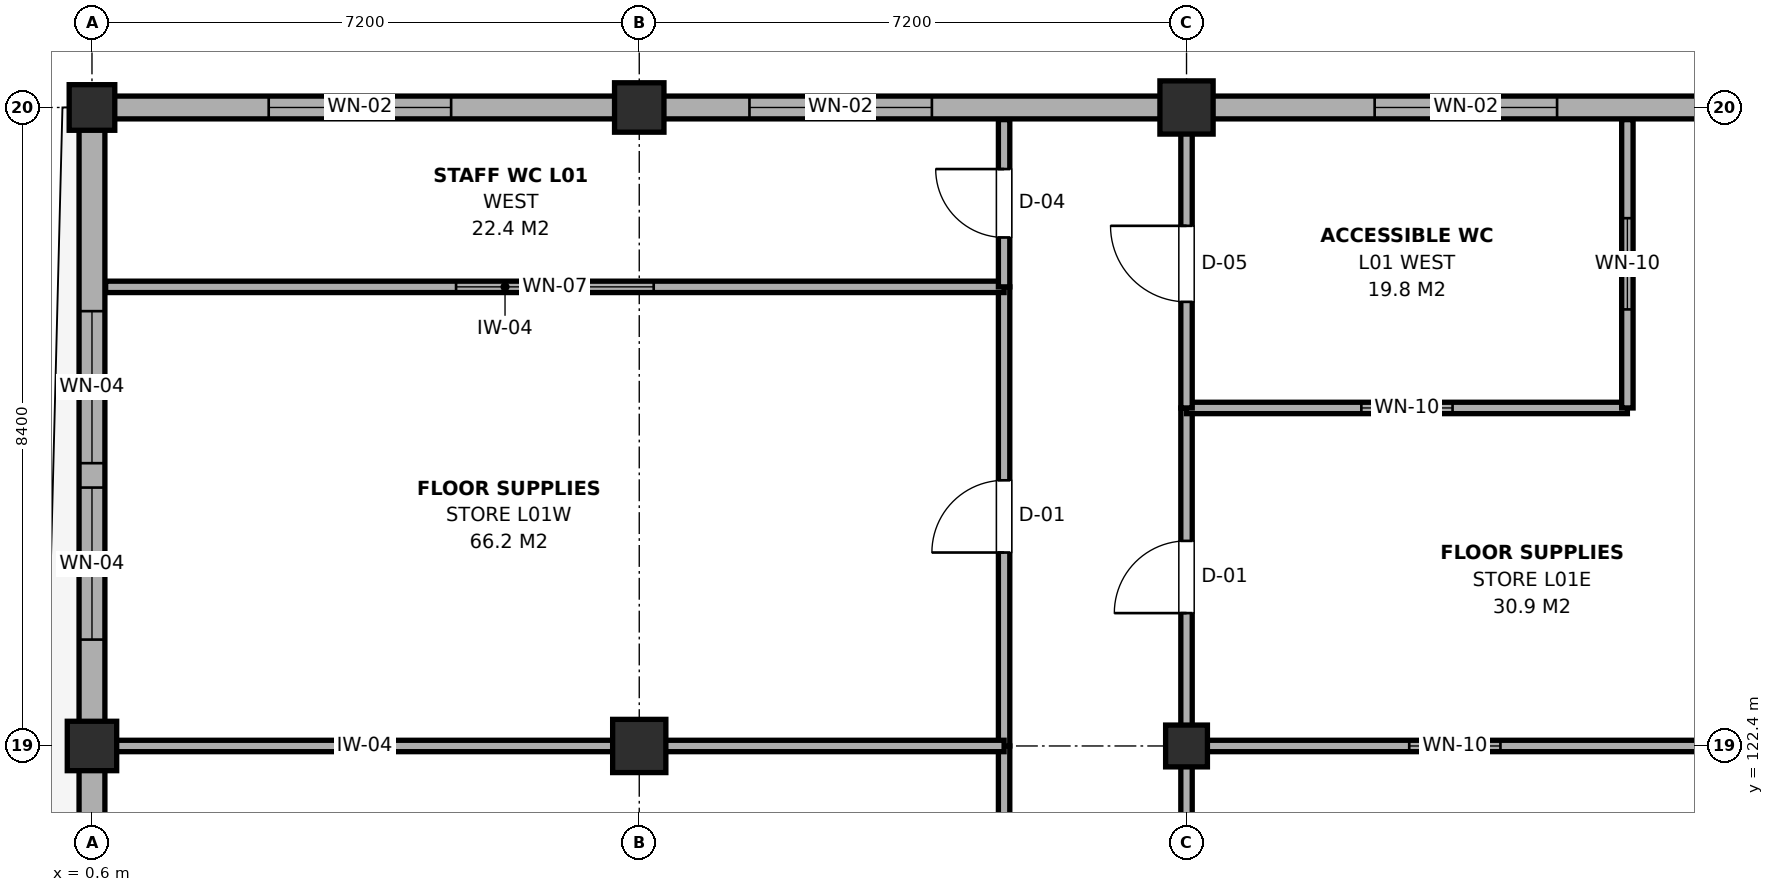
"""IFC4 building model, lengths in metres.
Left out: names, types, materials, properties, quantities, classifications, styles, units other than length and angle.
Written with IfcOpenShell. Run it as: python <this file> out.ifc"""

import sys

from ifc_helpers import new_model, si_unit, direction, frame, frame_2d, origin, origin_2d, place, context, subcontext, project, spatial, rectangle, extrude, element, fill, save


model = new_model("IFC4")
c1 = context("Model", 3, precision=1e-05, world=origin(), true_north=direction((0.0, 1.0)))
c2 = subcontext(c1, "Body", "Model", "MODEL_VIEW")
j1 = project(units=[si_unit("LENGTHUNIT", "METRE"), si_unit("PLANEANGLEUNIT", "RADIAN")], contexts=[c1])
p1 = place(None, origin())
s1 = spatial("IfcSite", under=j1, at=p1, CompositionType="ELEMENT")
p2 = place(p1, origin())
s2 = spatial("IfcBuilding", under=s1, at=p2, CompositionType="ELEMENT")
p3 = place(p2, frame((0.0, 0.0, 4.8)))
s3 = spatial("IfcBuildingStorey", under=s2, at=p3, CompositionType="ELEMENT", Elevation=4.8)
p4 = place(p3, frame((0.6, 122.4, 0.0), z_axis=(0.0, 0.0, 1.0), x_axis=(1.0, 0.0, 0.0)))
e1 = element("IfcColumn", 1, at=p4, inside=s3, PredefinedType="COLUMN", context=c2, shape_type="SweptSolid", body=[
    extrude(rectangle(XDim=0.65, YDim=0.65, at=origin_2d()), origin(), (0.0, 0.0, 1.0), 4.2),
])
p5 = place(p3, frame((0.6, 130.8, 0.0), z_axis=(0.0, 0.0, 1.0), x_axis=(1.0, 0.0, 0.0)))
e2 = element("IfcColumn", 2, at=p5, inside=s3, PredefinedType="COLUMN", context=c2, shape_type="SweptSolid", body=[
    extrude(rectangle(XDim=0.6, YDim=0.6, at=origin_2d()), origin(), (0.0, 0.0, 1.0), 4.2),
])
p6 = place(p3, frame((7.8, 122.4, 0.0), z_axis=(0.0, 0.0, 1.0), x_axis=(1.0, 0.0, 0.0)))
e3 = element("IfcColumn", 3, at=p6, inside=s3, PredefinedType="COLUMN", context=c2, shape_type="SweptSolid", body=[
    extrude(rectangle(XDim=0.7, YDim=0.7, at=origin_2d()), origin(), (0.0, 0.0, 1.0), 4.2),
])
p7 = place(p3, frame((7.8, 130.8, 0.0), z_axis=(0.0, 0.0, 1.0), x_axis=(1.0, 0.0, 0.0)))
e4 = element("IfcColumn", 4, at=p7, inside=s3, PredefinedType="COLUMN", context=c2, shape_type="SweptSolid", body=[
    extrude(rectangle(XDim=0.65, YDim=0.65, at=origin_2d()), origin(), (0.0, 0.0, 1.0), 4.2),
])
p8 = place(p3, frame((15.0, 122.4, 0.0), z_axis=(0.0, 0.0, 1.0), x_axis=(1.0, 0.0, 0.0)))
e5 = element("IfcColumn", 5, at=p8, inside=s3, PredefinedType="COLUMN", context=c2, shape_type="SweptSolid", body=[
    extrude(rectangle(XDim=0.55, YDim=0.55, at=origin_2d()), origin(), (0.0, 0.0, 1.0), 4.2),
])
p9 = place(p3, frame((15.0, 130.8, 0.0), z_axis=(0.0, 0.0, 1.0), x_axis=(1.0, 0.0, 0.0)))
e6 = element("IfcColumn", 6, at=p9, inside=s3, PredefinedType="COLUMN", context=c2, shape_type="SweptSolid", body=[
    extrude(rectangle(XDim=0.7, YDim=0.7, at=origin_2d()), origin(), (0.0, 0.0, 1.0), 4.2),
])
p10 = place(p3, frame((0.6, 113.4, 0.0), z_axis=(0.0, 0.0, 1.0), x_axis=(0.0, 1.0, 0.0)))
e7 = element("IfcWall", 7, at=p10, inside=s3, PredefinedType="SOLIDWALL", context=c2, shape_type="SweptSolid", body=[
    extrude(rectangle(XDim=9.0, YDim=0.34, at=frame_2d((4.5, 0.0))), origin(), (0.0, 0.0, 1.0), 3.585),
])
p11 = place(p10, frame((1.52, 0.0, 0.9)))
e8 = element("IfcOpeningElement", 8, at=p11, cuts=e7, PredefinedType="OPENING", context=c2, shape_type="SweptSolid", body=[
    extrude(rectangle(XDim=2.0, YDim=1.8, at=frame_2d((1.0, 0.9))), frame((0.0, 0.185, 0.0), z_axis=(0.0, -1.0, 0.0), x_axis=(1.0, 0.0, 0.0)), (0.0, 0.0, 1.0), 0.37),
])
p12 = place(p10, frame((5.48, 0.0, 0.9)))
e9 = element("IfcOpeningElement", 9, at=p12, cuts=e7, PredefinedType="OPENING", context=c2, shape_type="SweptSolid", body=[
    extrude(rectangle(XDim=2.0, YDim=1.8, at=frame_2d((1.0, 0.9))), frame((0.0, 0.185, 0.0), z_axis=(0.0, -1.0, 0.0), x_axis=(1.0, 0.0, 0.0)), (0.0, 0.0, 1.0), 0.37),
])
p13 = place(p3, frame((0.6, 122.4, 0.0), z_axis=(0.0, 0.0, 1.0), x_axis=(0.0, 1.0, 0.0)))
e10 = element("IfcWall", 10, at=p13, inside=s3, PredefinedType="SOLIDWALL", context=c2, shape_type="SweptSolid", body=[
    extrude(rectangle(XDim=8.57, YDim=0.34, at=frame_2d((4.285, 0.0))), origin(), (0.0, 0.0, 1.0), 3.625),
])
p14 = place(p13, frame((1.4, 0.0, 0.9)))
e11 = element("IfcOpeningElement", 11, at=p14, cuts=e10, PredefinedType="OPENING", context=c2, shape_type="SweptSolid", body=[
    extrude(rectangle(XDim=2.0, YDim=1.8, at=frame_2d((1.0, 0.9))), frame((0.0, 0.185, 0.0), z_axis=(0.0, -1.0, 0.0), x_axis=(1.0, 0.0, 0.0)), (0.0, 0.0, 1.0), 0.37),
])
p15 = place(p13, frame((3.72, 0.0, 0.9)))
e12 = element("IfcOpeningElement", 12, at=p15, cuts=e10, PredefinedType="OPENING", context=c2, shape_type="SweptSolid", body=[
    extrude(rectangle(XDim=2.0, YDim=1.8, at=frame_2d((1.0, 0.9))), frame((0.0, 0.185, 0.0), z_axis=(0.0, -1.0, 0.0), x_axis=(1.0, 0.0, 0.0)), (0.0, 0.0, 1.0), 0.37),
])
p16 = place(p3, frame((0.45, 130.8, 0.0), z_axis=(0.0, 0.0, 1.0), x_axis=(1.0, 0.0, 0.0)))
e13 = element("IfcWall", 13, at=p16, inside=s3, PredefinedType="SOLIDWALL", context=c2, shape_type="SweptSolid", body=[
    extrude(rectangle(XDim=7.35, YDim=0.3, at=frame_2d((3.675, 0.0))), origin(), (0.0, 0.0, 1.0), 3.425),
])
p17 = place(p16, frame((2.475, 0.0, 0.9)))
e14 = element("IfcOpeningElement", 14, at=p17, cuts=e13, PredefinedType="OPENING", context=c2, shape_type="SweptSolid", body=[
    extrude(rectangle(XDim=2.4, YDim=2.1, at=frame_2d((1.2, 1.05))), frame((0.0, 0.165, 0.0), z_axis=(0.0, -1.0, 0.0), x_axis=(1.0, 0.0, 0.0)), (0.0, 0.0, 1.0), 0.33),
])
p18 = place(p3, frame((7.8, 130.8, 0.0), z_axis=(0.0, 0.0, 1.0), x_axis=(1.0, 0.0, 0.0)))
e15 = element("IfcWall", 15, at=p18, inside=s3, PredefinedType="SOLIDWALL", context=c2, shape_type="SweptSolid", body=[
    extrude(rectangle(XDim=7.2, YDim=0.3, at=frame_2d((3.6, 0.0))), origin(), (0.0, 0.0, 1.0), 3.475),
])
p19 = place(p18, frame((1.45, 0.0, 0.9)))
e16 = element("IfcOpeningElement", 16, at=p19, cuts=e15, PredefinedType="OPENING", context=c2, shape_type="SweptSolid", body=[
    extrude(rectangle(XDim=2.4, YDim=2.1, at=frame_2d((1.2, 1.05))), frame((0.0, 0.165, 0.0), z_axis=(0.0, -1.0, 0.0), x_axis=(1.0, 0.0, 0.0)), (0.0, 0.0, 1.0), 0.33),
])
p20 = place(p3, frame((15.0, 130.8, 0.0), z_axis=(0.0, 0.0, 1.0), x_axis=(1.0, 0.0, 0.0)))
e17 = element("IfcWall", 17, at=p20, inside=s3, PredefinedType="SOLIDWALL", context=c2, shape_type="SweptSolid", body=[
    extrude(rectangle(XDim=7.35, YDim=0.3, at=frame_2d((3.675, 0.0))), origin(), (0.0, 0.0, 1.0), 3.525),
])
p21 = place(p20, frame((2.475, 0.0, 0.9)))
e18 = element("IfcOpeningElement", 18, at=p21, cuts=e17, PredefinedType="OPENING", context=c2, shape_type="SweptSolid", body=[
    extrude(rectangle(XDim=2.4, YDim=2.1, at=frame_2d((1.2, 1.05))), frame((0.0, 0.165, 0.0), z_axis=(0.0, -1.0, 0.0), x_axis=(1.0, 0.0, 0.0)), (0.0, 0.0, 1.0), 0.33),
])
p22 = place(p3, frame((12.6, 104.4, 0.0), z_axis=(0.0, 0.0, 1.0), x_axis=(0.0, 1.0, 0.0)))
e19 = element("IfcWall", 19, at=p22, inside=s3, PredefinedType="PARTITIONING", context=c2, shape_type="SweptSolid", body=[
    extrude(rectangle(XDim=18.0, YDim=0.15, at=frame_2d((9.0, 0.0))), origin(), (0.0, 0.0, 1.0), 3.375),
])
p23 = place(p22, frame((8.2, 0.0, 0.0)))
e20 = element("IfcOpeningElement", 20, at=p23, cuts=e19, PredefinedType="OPENING", context=c2, shape_type="SweptSolid", body=[
    extrude(rectangle(XDim=1.6, YDim=2.15, at=frame_2d((0.8, 1.075))), frame((0.0, 0.09, 0.0), z_axis=(0.0, -1.0, 0.0), x_axis=(1.0, 0.0, 0.0)), (0.0, 0.0, 1.0), 0.18),
])
p24 = place(p22, frame((3.2, 0.0, 0.95)))
e21 = element("IfcOpeningElement", 21, at=p24, cuts=e19, PredefinedType="OPENING", context=c2, shape_type="SweptSolid", body=[
    extrude(rectangle(XDim=2.6, YDim=1.5, at=frame_2d((1.3, 0.75))), frame((0.0, 0.09, 0.0), z_axis=(0.0, -1.0, 0.0), x_axis=(1.0, 0.0, 0.0)), (0.0, 0.0, 1.0), 0.18),
])
p25 = place(p22, frame((12.2, 0.0, 0.95)))
e22 = element("IfcOpeningElement", 22, at=p25, cuts=e19, PredefinedType="OPENING", context=c2, shape_type="SweptSolid", body=[
    extrude(rectangle(XDim=2.6, YDim=1.5, at=frame_2d((1.3, 0.75))), frame((0.0, 0.09, 0.0), z_axis=(0.0, -1.0, 0.0), x_axis=(1.0, 0.0, 0.0)), (0.0, 0.0, 1.0), 0.18),
])
p26 = place(p3, frame((12.6, 122.4, 0.0), z_axis=(0.0, 0.0, 1.0), x_axis=(0.0, 1.0, 0.0)))
e23 = element("IfcWall", 23, at=p26, inside=s3, PredefinedType="PARTITIONING", context=c2, shape_type="SweptSolid", body=[
    extrude(rectangle(XDim=6.04, YDim=0.15, at=frame_2d((3.02, 0.0))), origin(), (0.0, 0.0, 1.0), 3.425),
])
p27 = place(p26, frame((2.545, 0.0, 0.0)))
e24 = element("IfcOpeningElement", 24, at=p27, cuts=e23, PredefinedType="OPENING", context=c2, shape_type="SweptSolid", body=[
    extrude(rectangle(XDim=0.95, YDim=2.15, at=frame_2d((0.475, 1.075))), frame((0.0, 0.09, 0.0), z_axis=(0.0, -1.0, 0.0), x_axis=(1.0, 0.0, 0.0)), (0.0, 0.0, 1.0), 0.18),
])
p28 = place(p3, frame((0.78, 128.44, 0.0), z_axis=(0.0, 0.0, 1.0), x_axis=(1.0, 0.0, 0.0)))
e25 = element("IfcWall", 25, at=p28, inside=s3, PredefinedType="PARTITIONING", context=c2, shape_type="SweptSolid", body=[
    extrude(rectangle(XDim=11.82, YDim=0.15, at=frame_2d((5.91, 0.0))), origin(), (0.0, 0.0, 1.0), 3.625),
])
p29 = place(p28, frame((4.61, 0.0, 0.95)))
e26 = element("IfcOpeningElement", 26, at=p29, cuts=e25, PredefinedType="OPENING", context=c2, shape_type="SweptSolid", body=[
    extrude(rectangle(XDim=2.6, YDim=1.5, at=frame_2d((1.3, 0.75))), frame((0.0, 0.09, 0.0), z_axis=(0.0, -1.0, 0.0), x_axis=(1.0, 0.0, 0.0)), (0.0, 0.0, 1.0), 0.18),
])
p30 = place(p3, frame((12.6, 128.44, 0.0), z_axis=(0.0, 0.0, 1.0), x_axis=(0.0, 1.0, 0.0)))
e27 = element("IfcWall", 27, at=p30, inside=s3, PredefinedType="PARTITIONING", context=c2, shape_type="SweptSolid", body=[
    extrude(rectangle(XDim=2.2, YDim=0.15, at=frame_2d((1.1, 0.0))), origin(), (0.0, 0.0, 1.0), 3.475),
])
p31 = place(p30, frame((0.65, 0.0, 0.0)))
e28 = element("IfcOpeningElement", 28, at=p31, cuts=e27, PredefinedType="OPENING", context=c2, shape_type="SweptSolid", body=[
    extrude(rectangle(XDim=0.9, YDim=2.15, at=frame_2d((0.45, 1.075))), frame((0.0, 0.09, 0.0), z_axis=(0.0, -1.0, 0.0), x_axis=(1.0, 0.0, 0.0)), (0.0, 0.0, 1.0), 0.18),
])
p32 = place(p3, frame((0.78, 122.4, 0.0), z_axis=(0.0, 0.0, 1.0), x_axis=(1.0, 0.0, 0.0)))
e29 = element("IfcWall", 29, at=p32, inside=s3, PredefinedType="PARTITIONING", context=c2, shape_type="SweptSolid", body=[
    extrude(rectangle(XDim=11.82, YDim=0.15, at=frame_2d((5.91, 0.0))), origin(), (0.0, 0.0, 1.0), 3.375),
])
p33 = place(p3, frame((15.0, 104.4, 0.0), z_axis=(0.0, 0.0, 1.0), x_axis=(0.0, 1.0, 0.0)))
e30 = element("IfcWall", 30, at=p33, inside=s3, PredefinedType="PARTITIONING", context=c2, shape_type="SweptSolid", body=[
    extrude(rectangle(XDim=18.0, YDim=0.15, at=frame_2d((9.0, 0.0))), origin(), (0.0, 0.0, 1.0), 3.535),
])
p34 = place(p33, frame((9.375, 0.0, 0.0)))
e31 = element("IfcOpeningElement", 31, at=p34, cuts=e30, PredefinedType="OPENING", context=c2, shape_type="SweptSolid", body=[
    extrude(rectangle(XDim=1.05, YDim=2.15, at=frame_2d((0.525, 1.075))), frame((0.0, 0.09, 0.0), z_axis=(0.0, -1.0, 0.0), x_axis=(1.0, 0.0, 0.0)), (0.0, 0.0, 1.0), 0.18),
])
p35 = place(p33, frame((3.2, 0.0, 0.95)))
e32 = element("IfcOpeningElement", 32, at=p35, cuts=e30, PredefinedType="OPENING", context=c2, shape_type="SweptSolid", body=[
    extrude(rectangle(XDim=2.6, YDim=1.5, at=frame_2d((1.3, 0.75))), frame((0.0, 0.09, 0.0), z_axis=(0.0, -1.0, 0.0), x_axis=(1.0, 0.0, 0.0)), (0.0, 0.0, 1.0), 0.18),
])
p36 = place(p33, frame((12.2, 0.0, 0.95)))
e33 = element("IfcOpeningElement", 33, at=p36, cuts=e30, PredefinedType="OPENING", context=c2, shape_type="SweptSolid", body=[
    extrude(rectangle(XDim=2.6, YDim=1.5, at=frame_2d((1.3, 0.75))), frame((0.0, 0.09, 0.0), z_axis=(0.0, -1.0, 0.0), x_axis=(1.0, 0.0, 0.0)), (0.0, 0.0, 1.0), 0.18),
])
p37 = place(p3, frame((15.0, 122.4, 0.0), z_axis=(0.0, 0.0, 1.0), x_axis=(0.0, 1.0, 0.0)))
e34 = element("IfcWall", 34, at=p37, inside=s3, PredefinedType="PARTITIONING", context=c2, shape_type="SweptSolid", body=[
    extrude(rectangle(XDim=4.447, YDim=0.15, at=frame_2d((2.224, 0.0))), origin(), (0.0, 0.0, 1.0), 3.585),
])
p38 = place(p37, frame((1.748, 0.0, 0.0)))
e35 = element("IfcOpeningElement", 35, at=p38, cuts=e34, PredefinedType="OPENING", context=c2, shape_type="SweptSolid", body=[
    extrude(rectangle(XDim=0.95, YDim=2.15, at=frame_2d((0.475, 1.075))), frame((0.0, 0.09, 0.0), z_axis=(0.0, -1.0, 0.0), x_axis=(1.0, 0.0, 0.0)), (0.0, 0.0, 1.0), 0.18),
])
p39 = place(p3, frame((15.0, 126.847, 0.0), z_axis=(0.0, 0.0, 1.0), x_axis=(1.0, 0.0, 0.0)))
e36 = element("IfcWall", 36, at=p39, inside=s3, PredefinedType="PARTITIONING", context=c2, shape_type="SweptSolid", body=[
    extrude(rectangle(XDim=5.8, YDim=0.15, at=frame_2d((2.9, 0.0))), origin(), (0.0, 0.0, 1.0), 3.625),
])
p40 = place(p39, frame((2.3, 0.0, 0.95)))
e37 = element("IfcOpeningElement", 37, at=p40, cuts=e36, PredefinedType="OPENING", context=c2, shape_type="SweptSolid", body=[
    extrude(rectangle(XDim=1.2, YDim=1.5, at=frame_2d((0.6, 0.75))), frame((0.0, 0.09, 0.0), z_axis=(0.0, -1.0, 0.0), x_axis=(1.0, 0.0, 0.0)), (0.0, 0.0, 1.0), 0.18),
])
p41 = place(p3, frame((20.8, 126.847, 0.0), z_axis=(0.0, 0.0, 1.0), x_axis=(0.0, 1.0, 0.0)))
e38 = element("IfcWall", 38, at=p41, inside=s3, PredefinedType="PARTITIONING", context=c2, shape_type="SweptSolid", body=[
    extrude(rectangle(XDim=3.793, YDim=0.15, at=frame_2d((1.896, 0.0))), origin(), (0.0, 0.0, 1.0), 3.525),
])
p42 = place(p41, frame((1.296, 0.0, 0.95)))
e39 = element("IfcOpeningElement", 39, at=p42, cuts=e38, PredefinedType="OPENING", context=c2, shape_type="SweptSolid", body=[
    extrude(rectangle(XDim=1.2, YDim=1.5, at=frame_2d((0.6, 0.75))), frame((0.0, 0.09, 0.0), z_axis=(0.0, -1.0, 0.0), x_axis=(1.0, 0.0, 0.0)), (0.0, 0.0, 1.0), 0.18),
])
p43 = place(p3, frame((15.0, 126.847, 0.0), z_axis=(0.0, 0.0, 1.0), x_axis=(0.0, 1.0, 0.0)))
e40 = element("IfcWall", 40, at=p43, inside=s3, PredefinedType="PARTITIONING", context=c2, shape_type="SweptSolid", body=[
    extrude(rectangle(XDim=3.793, YDim=0.15, at=frame_2d((1.896, 0.0))), origin(), (0.0, 0.0, 1.0), 3.625),
])
p44 = place(p43, frame((1.396, 0.0, 0.0)))
e41 = element("IfcOpeningElement", 41, at=p44, cuts=e40, PredefinedType="OPENING", context=c2, shape_type="SweptSolid", body=[
    extrude(rectangle(XDim=1.0, YDim=2.15, at=frame_2d((0.5, 1.075))), frame((0.0, 0.09, 0.0), z_axis=(0.0, -1.0, 0.0), x_axis=(1.0, 0.0, 0.0)), (0.0, 0.0, 1.0), 0.18),
])
p45 = place(p3, frame((15.0, 122.4, 0.0), z_axis=(0.0, 0.0, 1.0), x_axis=(1.0, 0.0, 0.0)))
e42 = element("IfcWall", 42, at=p45, inside=s3, PredefinedType="PARTITIONING", context=c2, shape_type="SweptSolid", body=[
    extrude(rectangle(XDim=7.06, YDim=0.15, at=frame_2d((3.53, 0.0))), origin(), (0.0, 0.0, 1.0), 3.425),
])
p46 = place(p45, frame((2.93, 0.0, 0.95)))
e43 = element("IfcOpeningElement", 43, at=p46, cuts=e42, PredefinedType="OPENING", context=c2, shape_type="SweptSolid", body=[
    extrude(rectangle(XDim=1.2, YDim=1.5, at=frame_2d((0.6, 0.75))), frame((0.0, 0.09, 0.0), z_axis=(0.0, -1.0, 0.0), x_axis=(1.0, 0.0, 0.0)), (0.0, 0.0, 1.0), 0.18),
])
p47 = place(p14, origin())
e44 = element("IfcWindow", 44, at=p47, inside=s3, PartitioningType="SINGLE_PANEL", PredefinedType="WINDOW", context=c2, shape_type="SweptSolid", body=[
    extrude(rectangle(XDim=2.0, YDim=1.8, at=frame_2d((1.0, 0.9))), frame((0.0, 0.03, 0.0), z_axis=(0.0, -1.0, 0.0), x_axis=(1.0, 0.0, 0.0)), (0.0, 0.0, 1.0), 0.06),
])
fill(e11, e44)
p48 = place(p15, origin())
e45 = element("IfcWindow", 45, at=p48, inside=s3, PartitioningType="SINGLE_PANEL", PredefinedType="WINDOW", context=c2, shape_type="SweptSolid", body=[
    extrude(rectangle(XDim=2.0, YDim=1.8, at=frame_2d((1.0, 0.9))), frame((0.0, 0.03, 0.0), z_axis=(0.0, -1.0, 0.0), x_axis=(1.0, 0.0, 0.0)), (0.0, 0.0, 1.0), 0.06),
])
fill(e12, e45)
p49 = place(p17, origin())
e46 = element("IfcWindow", 46, at=p49, inside=s3, PartitioningType="SINGLE_PANEL", PredefinedType="WINDOW", context=c2, shape_type="SweptSolid", body=[
    extrude(rectangle(XDim=2.4, YDim=2.1, at=frame_2d((1.2, 1.05))), frame((0.0, 0.03, 0.0), z_axis=(0.0, -1.0, 0.0), x_axis=(1.0, 0.0, 0.0)), (0.0, 0.0, 1.0), 0.06),
])
fill(e14, e46)
p50 = place(p19, origin())
e47 = element("IfcWindow", 47, at=p50, inside=s3, PartitioningType="SINGLE_PANEL", PredefinedType="WINDOW", context=c2, shape_type="SweptSolid", body=[
    extrude(rectangle(XDim=2.4, YDim=2.1, at=frame_2d((1.2, 1.05))), frame((0.0, 0.03, 0.0), z_axis=(0.0, -1.0, 0.0), x_axis=(1.0, 0.0, 0.0)), (0.0, 0.0, 1.0), 0.06),
])
fill(e16, e47)
p51 = place(p21, origin())
e48 = element("IfcWindow", 48, at=p51, inside=s3, PartitioningType="SINGLE_PANEL", PredefinedType="WINDOW", context=c2, shape_type="SweptSolid", body=[
    extrude(rectangle(XDim=2.4, YDim=2.1, at=frame_2d((1.2, 1.05))), frame((0.0, 0.03, 0.0), z_axis=(0.0, -1.0, 0.0), x_axis=(1.0, 0.0, 0.0)), (0.0, 0.0, 1.0), 0.06),
])
fill(e18, e48)
p52 = place(p27, origin())
e49 = element("IfcDoor", 49, at=p52, inside=s3, OperationType="SINGLE_SWING_LEFT", PredefinedType="DOOR", context=c2, shape_type="SweptSolid", body=[
    extrude(rectangle(XDim=0.95, YDim=2.15, at=frame_2d((0.475, 1.075))), frame((0.0, 0.025, 0.0), z_axis=(0.0, -1.0, 0.0), x_axis=(1.0, 0.0, 0.0)), (0.0, 0.0, 1.0), 0.05),
])
fill(e24, e49)
p53 = place(p29, origin())
e50 = element("IfcWindow", 50, at=p53, inside=s3, PartitioningType="SINGLE_PANEL", PredefinedType="WINDOW", context=c2, shape_type="SweptSolid", body=[
    extrude(rectangle(XDim=2.6, YDim=1.5, at=frame_2d((1.3, 0.75))), frame((0.0, 0.03, 0.0), z_axis=(0.0, -1.0, 0.0), x_axis=(1.0, 0.0, 0.0)), (0.0, 0.0, 1.0), 0.06),
])
fill(e26, e50)
p54 = place(p31, origin())
e51 = element("IfcDoor", 51, at=p54, inside=s3, OperationType="SINGLE_SWING_RIGHT", PredefinedType="DOOR", context=c2, shape_type="SweptSolid", body=[
    extrude(rectangle(XDim=0.9, YDim=2.15, at=frame_2d((0.45, 1.075))), frame((0.0, 0.025, 0.0), z_axis=(0.0, -1.0, 0.0), x_axis=(1.0, 0.0, 0.0)), (0.0, 0.0, 1.0), 0.05),
])
fill(e28, e51)
p55 = place(p38, origin())
e52 = element("IfcDoor", 52, at=p55, inside=s3, OperationType="SINGLE_SWING_LEFT", PredefinedType="DOOR", context=c2, shape_type="SweptSolid", body=[
    extrude(rectangle(XDim=0.95, YDim=2.15, at=frame_2d((0.475, 1.075))), frame((0.0, 0.025, 0.0), z_axis=(0.0, -1.0, 0.0), x_axis=(1.0, 0.0, 0.0)), (0.0, 0.0, 1.0), 0.05),
])
fill(e35, e52)
p56 = place(p40, origin())
e53 = element("IfcWindow", 53, at=p56, inside=s3, PartitioningType="SINGLE_PANEL", PredefinedType="WINDOW", context=c2, shape_type="SweptSolid", body=[
    extrude(rectangle(XDim=1.2, YDim=1.5, at=frame_2d((0.6, 0.75))), frame((0.0, 0.03, 0.0), z_axis=(0.0, -1.0, 0.0), x_axis=(1.0, 0.0, 0.0)), (0.0, 0.0, 1.0), 0.06),
])
fill(e37, e53)
p57 = place(p42, origin())
e54 = element("IfcWindow", 54, at=p57, inside=s3, PartitioningType="SINGLE_PANEL", PredefinedType="WINDOW", context=c2, shape_type="SweptSolid", body=[
    extrude(rectangle(XDim=1.2, YDim=1.5, at=frame_2d((0.6, 0.75))), frame((0.0, 0.03, 0.0), z_axis=(0.0, -1.0, 0.0), x_axis=(1.0, 0.0, 0.0)), (0.0, 0.0, 1.0), 0.06),
])
fill(e39, e54)
p58 = place(p44, origin())
e55 = element("IfcDoor", 55, at=p58, inside=s3, OperationType="SINGLE_SWING_RIGHT", PredefinedType="DOOR", context=c2, shape_type="SweptSolid", body=[
    extrude(rectangle(XDim=1.0, YDim=2.15, at=frame_2d((0.5, 1.075))), frame((0.0, 0.025, 0.0), z_axis=(0.0, -1.0, 0.0), x_axis=(1.0, 0.0, 0.0)), (0.0, 0.0, 1.0), 0.05),
])
fill(e41, e55)
p59 = place(p46, origin())
e56 = element("IfcWindow", 56, at=p59, inside=s3, PartitioningType="SINGLE_PANEL", PredefinedType="WINDOW", context=c2, shape_type="SweptSolid", body=[
    extrude(rectangle(XDim=1.2, YDim=1.5, at=frame_2d((0.6, 0.75))), frame((0.0, 0.03, 0.0), z_axis=(0.0, -1.0, 0.0), x_axis=(1.0, 0.0, 0.0)), (0.0, 0.0, 1.0), 0.06),
])
fill(e43, e56)
save(model, sys.argv[1])
